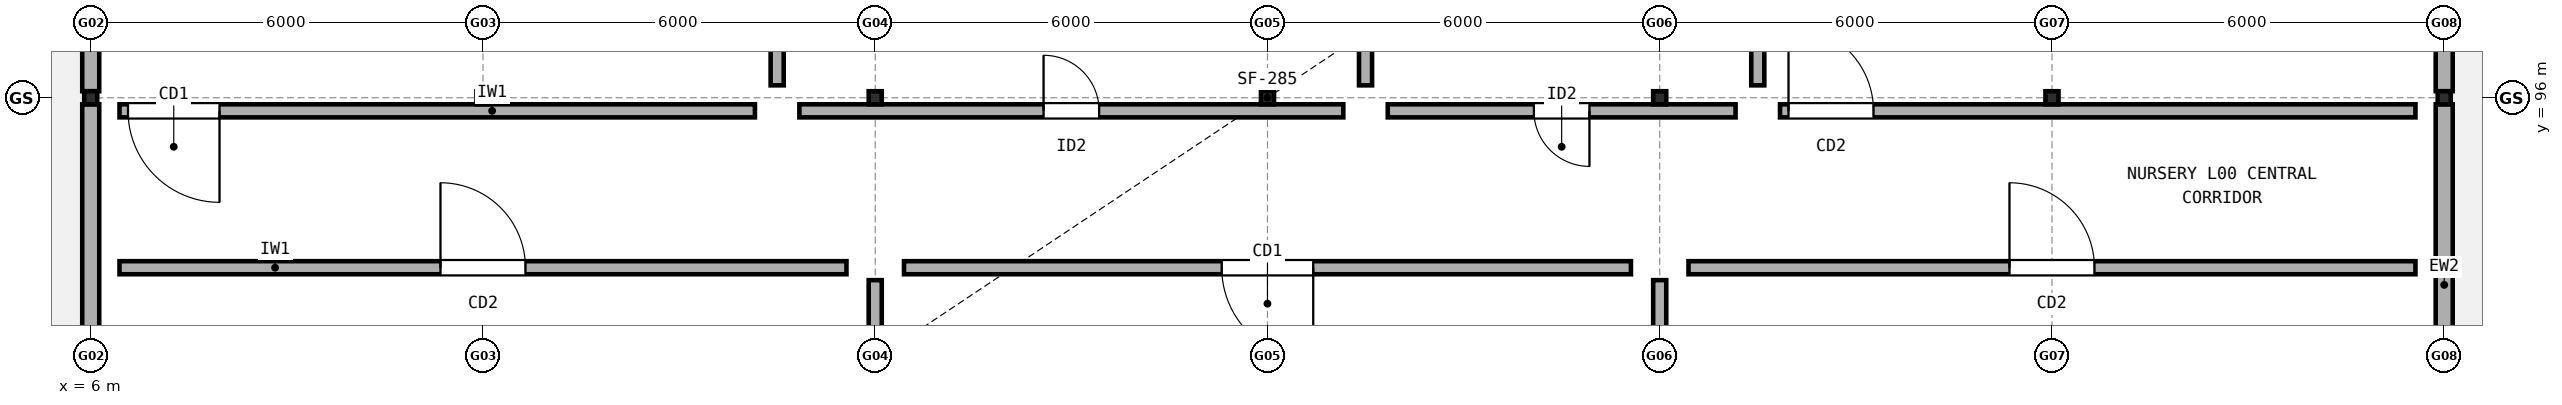
"""IFC4 building model, lengths in metres.
Left out: names, types, materials, properties, quantities, classifications, styles, units other than length and angle.
Written with IfcOpenShell. Run it as: python <this file> out.ifc"""

import sys

from ifc_helpers import new_model, si_unit, direction, frame, frame_2d, origin, origin_2d, place, context, subcontext, project, spatial, rectangle, i_section, extrude, element, fill, save


model = new_model("IFC4")
c1 = context("Model", 3, precision=1e-05, world=origin(), true_north=direction((0.0, 1.0)))
c2 = subcontext(c1, "Body", "Model", "MODEL_VIEW")
j1 = project(units=[si_unit("LENGTHUNIT", "METRE"), si_unit("PLANEANGLEUNIT", "RADIAN")], contexts=[c1])
p1 = place(None, origin())
s1 = spatial("IfcSite", under=j1, at=p1, CompositionType="ELEMENT")
p2 = place(p1, origin())
s2 = spatial("IfcBuilding", under=s1, at=p2, CompositionType="ELEMENT")
p3 = place(p2, origin())
s3 = spatial("IfcBuildingStorey", under=s2, at=p3, CompositionType="ELEMENT", Elevation=0.0)
for number, where, z_axis, x_axis in (
    (1, (6.0, 96.0, 0.0), (0.0, 0.0, 1.0), (1.0, 0.0, 0.0)),
    (2, (12.0, 96.0, 0.0), (0.0, 0.0, 1.0), (1.0, 0.0, 0.0)),
    (3, (18.0, 96.0, 0.0), (0.0, 0.0, 1.0), (1.0, 0.0, 0.0)),
    (4, (24.0, 96.0, 0.0), (0.0, 0.0, 1.0), (1.0, 0.0, 0.0)),
    (5, (30.0, 96.0, 0.0), (0.0, 0.0, 1.0), (1.0, 0.0, 0.0)),
    (6, (36.0, 96.0, 0.0), (0.0, 0.0, 1.0), (1.0, 0.0, 0.0)),
    (7, (42.0, 96.0, 0.0), (0.0, 0.0, 1.0), (1.0, 0.0, 0.0)),
):
    element("IfcColumn", number, at=place(p3, frame(where, z_axis=z_axis, x_axis=x_axis)), inside=s3, PredefinedType="COLUMN", context=c2, shape_type="SweptSolid", body=[
        extrude(i_section(OverallWidth=0.2, OverallDepth=0.2, WebThickness=0.009, FlangeThickness=0.015, FilletRadius=0.018, at=origin_2d()), origin(), (0.0, 0.0, 1.0), 4.23),
    ])
p4 = place(p3, frame((6.0, 95.9, 0.0), z_axis=(0.0, 0.0, 1.0), x_axis=(0.0, -1.0, 0.0)))
e8 = element("IfcWall", 8, at=p4, inside=s3, PredefinedType="STANDARD", context=c2, shape_type="SweptSolid", body=[
    extrude(rectangle(XDim=11.675, YDim=0.26, at=frame_2d((5.837, 0.0))), origin(), (0.0, 0.0, 1.0), 2.912),
])
p5 = place(p4, frame((4.2, 0.0, 0.85)))
e9 = element("IfcOpeningElement", 9, at=p5, cuts=e8, PredefinedType="OPENING", context=c2, shape_type="SweptSolid", body=[
    extrude(rectangle(XDim=1.8, YDim=1.45, at=frame_2d((0.9, 0.725))), frame((0.0, 0.14, 0.0), z_axis=(0.0, -1.0, 0.0), x_axis=(1.0, 0.0, 0.0)), (0.0, 0.0, 1.0), 0.28),
])
p6 = place(p3, frame((42.0, 84.225, 0.0), z_axis=(0.0, 0.0, 1.0), x_axis=(0.0, 1.0, 0.0)))
e10 = element("IfcWall", 10, at=p6, inside=s3, PredefinedType="STANDARD", context=c2, shape_type="SweptSolid", body=[
    extrude(rectangle(XDim=11.675, YDim=0.26, at=frame_2d((5.837, 0.0))), origin(), (0.0, 0.0, 1.0), 2.912),
])
p7 = place(p6, frame((4.2, 0.0, 0.85)))
e11 = element("IfcOpeningElement", 11, at=p7, cuts=e10, PredefinedType="OPENING", context=c2, shape_type="SweptSolid", body=[
    extrude(rectangle(XDim=1.8, YDim=1.45, at=frame_2d((0.9, 0.725))), frame((0.0, 0.14, 0.0), z_axis=(0.0, -1.0, 0.0), x_axis=(1.0, 0.0, 0.0)), (0.0, 0.0, 1.0), 0.28),
])
p8 = place(p3, frame((6.0, 107.775, 0.0), z_axis=(0.0, 0.0, 1.0), x_axis=(0.0, -1.0, 0.0)))
e12 = element("IfcWall", 12, at=p8, inside=s3, PredefinedType="STANDARD", context=c2, shape_type="SweptSolid", body=[
    extrude(rectangle(XDim=11.675, YDim=0.26, at=frame_2d((5.837, 0.0))), origin(), (0.0, 0.0, 1.0), 2.912),
])
p9 = place(p8, frame((4.2, 0.0, 0.85)))
e13 = element("IfcOpeningElement", 13, at=p9, cuts=e12, PredefinedType="OPENING", context=c2, shape_type="SweptSolid", body=[
    extrude(rectangle(XDim=1.8, YDim=1.45, at=frame_2d((0.9, 0.725))), frame((0.0, 0.14, 0.0), z_axis=(0.0, -1.0, 0.0), x_axis=(1.0, 0.0, 0.0)), (0.0, 0.0, 1.0), 0.28),
])
p10 = place(p3, frame((42.0, 96.1, 0.0), z_axis=(0.0, 0.0, 1.0), x_axis=(0.0, 1.0, 0.0)))
e14 = element("IfcWall", 14, at=p10, inside=s3, PredefinedType="STANDARD", context=c2, shape_type="SweptSolid", body=[
    extrude(rectangle(XDim=11.675, YDim=0.26, at=frame_2d((5.837, 0.0))), origin(), (0.0, 0.0, 1.0), 2.912),
])
p11 = place(p10, frame((4.2, 0.0, 0.85)))
e15 = element("IfcOpeningElement", 15, at=p11, cuts=e14, PredefinedType="OPENING", context=c2, shape_type="SweptSolid", body=[
    extrude(rectangle(XDim=1.8, YDim=1.45, at=frame_2d((0.9, 0.725))), frame((0.0, 0.14, 0.0), z_axis=(0.0, -1.0, 0.0), x_axis=(1.0, 0.0, 0.0)), (0.0, 0.0, 1.0), 0.28),
])
p12 = place(p3, frame((6.44, 93.4, 0.0), z_axis=(0.0, 0.0, 1.0), x_axis=(1.0, 0.0, 0.0)))
e16 = element("IfcWall", 16, at=p12, inside=s3, PredefinedType="SOLIDWALL", context=c2, shape_type="SweptSolid", body=[
    extrude(rectangle(XDim=11.12, YDim=0.2, at=frame_2d((5.56, 0.0))), origin(), (0.0, 0.0, 1.0), 4.23),
])
p13 = place(p12, frame((4.91, 0.0, 0.0)))
e17 = element("IfcOpeningElement", 17, at=p13, cuts=e16, PredefinedType="OPENING", context=c2, shape_type="SweptSolid", body=[
    extrude(rectangle(XDim=1.3, YDim=2.15, at=frame_2d((0.65, 1.075))), frame((0.0, 0.11, 0.0), z_axis=(0.0, -1.0, 0.0), x_axis=(1.0, 0.0, 0.0)), (0.0, 0.0, 1.0), 0.22),
])
p14 = place(p3, frame((18.0, 84.39, 0.0), z_axis=(0.0, 0.0, 1.0), x_axis=(0.0, 1.0, 0.0)))
e18 = element("IfcWall", 18, at=p14, inside=s3, PredefinedType="SOLIDWALL", context=c2, shape_type="SweptSolid", body=[
    extrude(rectangle(XDim=8.82, YDim=0.2, at=frame_2d((4.41, 0.0))), origin(), (0.0, 0.0, 1.0), 2.912),
])
p15 = place(p3, frame((18.44, 93.4, 0.0), z_axis=(0.0, 0.0, 1.0), x_axis=(1.0, 0.0, 0.0)))
e19 = element("IfcWall", 19, at=p15, inside=s3, PredefinedType="SOLIDWALL", context=c2, shape_type="SweptSolid", body=[
    extrude(rectangle(XDim=11.12, YDim=0.2, at=frame_2d((5.56, 0.0))), origin(), (0.0, 0.0, 1.0), 2.912),
])
p16 = place(p15, frame((4.86, 0.0, 0.0)))
e20 = element("IfcOpeningElement", 20, at=p16, cuts=e19, PredefinedType="OPENING", context=c2, shape_type="SweptSolid", body=[
    extrude(rectangle(XDim=1.4, YDim=2.15, at=frame_2d((0.7, 1.075))), frame((0.0, 0.11, 0.0), z_axis=(0.0, -1.0, 0.0), x_axis=(1.0, 0.0, 0.0)), (0.0, 0.0, 1.0), 0.22),
])
p17 = place(p3, frame((30.0, 84.39, 0.0), z_axis=(0.0, 0.0, 1.0), x_axis=(0.0, 1.0, 0.0)))
e21 = element("IfcWall", 21, at=p17, inside=s3, PredefinedType="SOLIDWALL", context=c2, shape_type="SweptSolid", body=[
    extrude(rectangle(XDim=8.82, YDim=0.2, at=frame_2d((4.41, 0.0))), origin(), (0.0, 0.0, 1.0), 2.912),
])
p18 = place(p3, frame((30.44, 93.4, 0.0), z_axis=(0.0, 0.0, 1.0), x_axis=(1.0, 0.0, 0.0)))
e22 = element("IfcWall", 22, at=p18, inside=s3, PredefinedType="SOLIDWALL", context=c2, shape_type="SweptSolid", body=[
    extrude(rectangle(XDim=11.12, YDim=0.2, at=frame_2d((5.56, 0.0))), origin(), (0.0, 0.0, 1.0), 2.912),
])
p19 = place(p18, frame((4.91, 0.0, 0.0)))
e23 = element("IfcOpeningElement", 23, at=p19, cuts=e22, PredefinedType="OPENING", context=c2, shape_type="SweptSolid", body=[
    extrude(rectangle(XDim=1.3, YDim=2.15, at=frame_2d((0.65, 1.075))), frame((0.0, 0.11, 0.0), z_axis=(0.0, -1.0, 0.0), x_axis=(1.0, 0.0, 0.0)), (0.0, 0.0, 1.0), 0.22),
])
p20 = place(p3, frame((6.44, 95.8, 0.0), z_axis=(0.0, 0.0, 1.0), x_axis=(1.0, 0.0, 0.0)))
e24 = element("IfcWall", 24, at=p20, inside=s3, PredefinedType="SOLIDWALL", context=c2, shape_type="SweptSolid", body=[
    extrude(rectangle(XDim=9.72, YDim=0.2, at=frame_2d((4.86, 0.0))), origin(), (0.0, 0.0, 1.0), 3.562),
])
p21 = place(p20, frame((0.13, 0.0, 0.0)))
e25 = element("IfcOpeningElement", 25, at=p21, cuts=e24, PredefinedType="OPENING", context=c2, shape_type="SweptSolid", body=[
    extrude(rectangle(XDim=1.4, YDim=2.15, at=frame_2d((0.7, 1.075))), frame((0.0, 0.11, 0.0), z_axis=(0.0, -1.0, 0.0), x_axis=(1.0, 0.0, 0.0)), (0.0, 0.0, 1.0), 0.22),
])
p22 = place(p3, frame((16.5, 96.19, 0.0), z_axis=(0.0, 0.0, 1.0), x_axis=(0.0, 1.0, 0.0)))
e26 = element("IfcWall", 26, at=p22, inside=s3, PredefinedType="SOLIDWALL", context=c2, shape_type="SweptSolid", body=[
    extrude(rectangle(XDim=11.62, YDim=0.2, at=frame_2d((5.81, 0.0))), origin(), (0.0, 0.0, 1.0), 3.112),
])
p23 = place(p3, frame((16.84, 95.8, 0.0), z_axis=(0.0, 0.0, 1.0), x_axis=(1.0, 0.0, 0.0)))
e27 = element("IfcWall", 27, at=p23, inside=s3, PredefinedType="SOLIDWALL", context=c2, shape_type="SweptSolid", body=[
    extrude(rectangle(XDim=8.32, YDim=0.2, at=frame_2d((4.16, 0.0))), origin(), (0.0, 0.0, 1.0), 2.912),
])
p24 = place(p23, frame((3.735, 0.0, 0.0)))
e28 = element("IfcOpeningElement", 28, at=p24, cuts=e27, PredefinedType="OPENING", context=c2, shape_type="SweptSolid", body=[
    extrude(rectangle(XDim=0.85, YDim=2.1, at=frame_2d((0.425, 1.05))), frame((0.0, 0.11, 0.0), z_axis=(0.0, -1.0, 0.0), x_axis=(1.0, 0.0, 0.0)), (0.0, 0.0, 1.0), 0.22),
])
p25 = place(p3, frame((25.5, 96.19, 0.0), z_axis=(0.0, 0.0, 1.0), x_axis=(0.0, 1.0, 0.0)))
e29 = element("IfcWall", 29, at=p25, inside=s3, PredefinedType="SOLIDWALL", context=c2, shape_type="SweptSolid", body=[
    extrude(rectangle(XDim=11.62, YDim=0.2, at=frame_2d((5.81, 0.0))), origin(), (0.0, 0.0, 1.0), 3.112),
])
p26 = place(p3, frame((25.84, 95.8, 0.0), z_axis=(0.0, 0.0, 1.0), x_axis=(1.0, 0.0, 0.0)))
e30 = element("IfcWall", 30, at=p26, inside=s3, PredefinedType="SOLIDWALL", context=c2, shape_type="SweptSolid", body=[
    extrude(rectangle(XDim=5.32, YDim=0.2, at=frame_2d((2.66, 0.0))), origin(), (0.0, 0.0, 1.0), 2.912),
])
p27 = place(p26, frame((2.235, 0.0, 0.0)))
e31 = element("IfcOpeningElement", 31, at=p27, cuts=e30, PredefinedType="OPENING", context=c2, shape_type="SweptSolid", body=[
    extrude(rectangle(XDim=0.85, YDim=2.1, at=frame_2d((0.425, 1.05))), frame((0.0, 0.11, 0.0), z_axis=(0.0, -1.0, 0.0), x_axis=(1.0, 0.0, 0.0)), (0.0, 0.0, 1.0), 0.22),
])
p28 = place(p3, frame((31.5, 96.19, 0.0), z_axis=(0.0, 0.0, 1.0), x_axis=(0.0, 1.0, 0.0)))
e32 = element("IfcWall", 32, at=p28, inside=s3, PredefinedType="SOLIDWALL", context=c2, shape_type="SweptSolid", body=[
    extrude(rectangle(XDim=11.62, YDim=0.2, at=frame_2d((5.81, 0.0))), origin(), (0.0, 0.0, 1.0), 3.112),
])
p29 = place(p3, frame((31.84, 95.8, 0.0), z_axis=(0.0, 0.0, 1.0), x_axis=(1.0, 0.0, 0.0)))
e33 = element("IfcWall", 33, at=p29, inside=s3, PredefinedType="SOLIDWALL", context=c2, shape_type="SweptSolid", body=[
    extrude(rectangle(XDim=9.72, YDim=0.2, at=frame_2d((4.86, 0.0))), origin(), (0.0, 0.0, 1.0), 2.912),
])
p30 = place(p29, frame((0.13, 0.0, 0.0)))
e34 = element("IfcOpeningElement", 34, at=p30, cuts=e33, PredefinedType="OPENING", context=c2, shape_type="SweptSolid", body=[
    extrude(rectangle(XDim=1.3, YDim=2.15, at=frame_2d((0.65, 1.075))), frame((0.0, 0.11, 0.0), z_axis=(0.0, -1.0, 0.0), x_axis=(1.0, 0.0, 0.0)), (0.0, 0.0, 1.0), 0.22),
])
p31 = place(p13, origin())
e35 = element("IfcDoor", 35, at=p31, inside=s3, OperationType="SINGLE_SWING_LEFT", PredefinedType="DOOR", context=c2, shape_type="SweptSolid", body=[
    extrude(rectangle(XDim=1.3, YDim=2.15, at=frame_2d((0.65, 1.075))), frame((0.0, 0.025, 0.0), z_axis=(0.0, -1.0, 0.0), x_axis=(1.0, 0.0, 0.0)), (0.0, 0.0, 1.0), 0.05),
])
fill(e17, e35)
p32 = place(p16, origin())
e36 = element("IfcDoor", 36, at=p32, inside=s3, OperationType="SINGLE_SWING_RIGHT", PredefinedType="DOOR", context=c2, shape_type="SweptSolid", body=[
    extrude(rectangle(XDim=1.4, YDim=2.15, at=frame_2d((0.7, 1.075))), frame((0.0, 0.025, 0.0), z_axis=(0.0, -1.0, 0.0), x_axis=(1.0, 0.0, 0.0)), (0.0, 0.0, 1.0), 0.05),
])
fill(e20, e36)
p33 = place(p19, origin())
e37 = element("IfcDoor", 37, at=p33, inside=s3, OperationType="SINGLE_SWING_LEFT", PredefinedType="DOOR", context=c2, shape_type="SweptSolid", body=[
    extrude(rectangle(XDim=1.3, YDim=2.15, at=frame_2d((0.65, 1.075))), frame((0.0, 0.025, 0.0), z_axis=(0.0, -1.0, 0.0), x_axis=(1.0, 0.0, 0.0)), (0.0, 0.0, 1.0), 0.05),
])
fill(e23, e37)
p34 = place(p21, origin())
e38 = element("IfcDoor", 38, at=p34, inside=s3, OperationType="SINGLE_SWING_RIGHT", PredefinedType="DOOR", context=c2, shape_type="SweptSolid", body=[
    extrude(rectangle(XDim=1.4, YDim=2.15, at=frame_2d((0.7, 1.075))), frame((0.0, 0.025, 0.0), z_axis=(0.0, -1.0, 0.0), x_axis=(1.0, 0.0, 0.0)), (0.0, 0.0, 1.0), 0.05),
])
fill(e25, e38)
p35 = place(p24, origin())
e39 = element("IfcDoor", 39, at=p35, inside=s3, OperationType="SINGLE_SWING_LEFT", PredefinedType="DOOR", context=c2, shape_type="SweptSolid", body=[
    extrude(rectangle(XDim=0.85, YDim=2.1, at=frame_2d((0.425, 1.05))), frame((0.0, 0.025, 0.0), z_axis=(0.0, -1.0, 0.0), x_axis=(1.0, 0.0, 0.0)), (0.0, 0.0, 1.0), 0.05),
])
fill(e28, e39)
p36 = place(p27, origin())
e40 = element("IfcDoor", 40, at=p36, inside=s3, OperationType="SINGLE_SWING_RIGHT", PredefinedType="DOOR", context=c2, shape_type="SweptSolid", body=[
    extrude(rectangle(XDim=0.85, YDim=2.1, at=frame_2d((0.425, 1.05))), frame((0.0, 0.025, 0.0), z_axis=(0.0, -1.0, 0.0), x_axis=(1.0, 0.0, 0.0)), (0.0, 0.0, 1.0), 0.05),
])
fill(e31, e40)
p37 = place(p30, origin())
e41 = element("IfcDoor", 41, at=p37, inside=s3, OperationType="SINGLE_SWING_LEFT", PredefinedType="DOOR", context=c2, shape_type="SweptSolid", body=[
    extrude(rectangle(XDim=1.3, YDim=2.15, at=frame_2d((0.65, 1.075))), frame((0.0, 0.025, 0.0), z_axis=(0.0, -1.0, 0.0), x_axis=(1.0, 0.0, 0.0)), (0.0, 0.0, 1.0), 0.05),
])
fill(e34, e41)
save(model, sys.argv[1])
